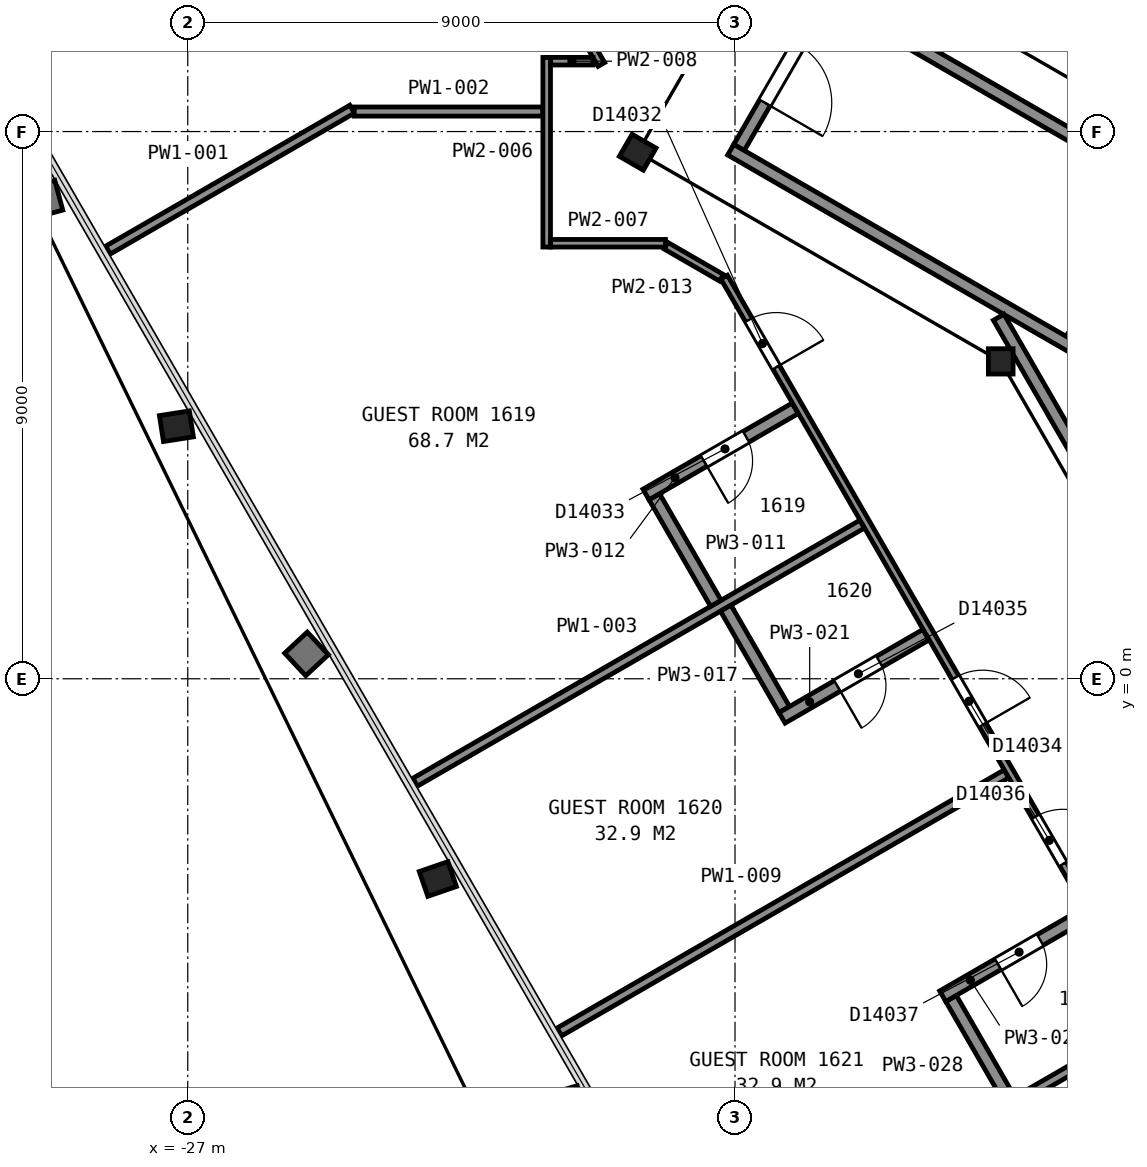
"""IFC4 building model, lengths in metres.
Left out: names, types, materials, properties, quantities, classifications, styles, units other than length and angle.
Written with IfcOpenShell. Run it as: python <this file> out.ifc"""

import sys

from ifc_helpers import new_model, si_unit, direction, frame, frame_2d, origin, origin_2d, place, context, subcontext, project, spatial, rectangle, i_section, extrude, element, fill, save


model = new_model("IFC4")
c1 = context("Model", 3, precision=1e-05, world=origin(), true_north=direction((0.0, 1.0)))
c2 = subcontext(c1, "Body", "Model", "MODEL_VIEW")
j1 = project(units=[si_unit("LENGTHUNIT", "METRE"), si_unit("PLANEANGLEUNIT", "RADIAN")], contexts=[c1])
p1 = place(None, origin())
s1 = spatial("IfcSite", under=j1, at=p1, CompositionType="ELEMENT")
p2 = place(p1, origin())
s2 = spatial("IfcBuilding", under=s1, at=p2, CompositionType="ELEMENT")
p3 = place(p2, frame((0.0, 0.0, 72.8)))
s3 = spatial("IfcBuildingStorey", under=s2, at=p3, CompositionType="ELEMENT", Elevation=72.8)
p4 = place(p3, frame((-27.082, 4.17, 0.025), z_axis=(-0.088495071019, -0.013835916676, 0.995980516785), x_axis=(-0.499820680913, 0.865523193885, -0.032386537004)))
e1 = element("IfcColumn", 1, at=p4, inside=s3, PredefinedType="COLUMN", context=c2, shape_type="SweptSolid", body=[
    extrude(i_section(OverallWidth=0.432, OverallDepth=0.498, WebThickness=0.056, FlangeThickness=0.089, FilletRadius=0.015, at=origin_2d()), origin(), (0.0, 0.0, 1.0), 3.564),
])
p5 = place(p3, frame((-22.792, -3.261, 0.025), z_axis=(-0.080240281001, -0.02768323956, 0.996391055536), x_axis=(-0.500071385104, 0.865832358147, -0.016215344149)))
e2 = element("IfcColumn", 2, at=p5, inside=s3, PredefinedType="COLUMN", context=c2, shape_type="SweptSolid", body=[
    extrude(i_section(OverallWidth=0.432, OverallDepth=0.498, WebThickness=0.056, FlangeThickness=0.089, FilletRadius=0.015, at=origin_2d()), origin(), (0.0, 0.0, 1.0), 3.563),
])
p6 = place(p3, frame((-19.6, 8.66, 0.0), z_axis=(0.0, 0.0, 1.0), x_axis=(0.5, 0.866025403784, 0.0)))
e3 = element("IfcColumn", 3, at=p6, inside=s3, PredefinedType="COLUMN", context=c2, shape_type="SweptSolid", body=[
    extrude(i_section(OverallWidth=0.419, OverallDepth=0.455, WebThickness=0.042, FlangeThickness=0.068, FilletRadius=0.015, at=origin_2d()), origin(), (0.0, 0.0, 1.0), 3.6),
])
p7 = place(p3, frame((-13.63, 5.22, 0.0), z_axis=(0.0, 0.0, 1.0), x_axis=(1.0, 0.0, 0.0)))
e4 = element("IfcColumn", 4, at=p7, inside=s3, PredefinedType="COLUMN", context=c2, shape_type="SweptSolid", body=[
    extrude(i_section(OverallWidth=0.406, OverallDepth=0.417, WebThickness=0.03, FlangeThickness=0.048, FilletRadius=0.015, at=origin_2d()), origin(), (0.0, 0.0, 1.0), 3.6),
])
p8 = place(p3, frame((-16.534, 11.162, 0.0), z_axis=(0.0, 0.0, 1.0), x_axis=(-0.49998411664, -0.866034573852, 0.0)))
e5 = element("IfcWall", 5, at=p8, inside=s3, PredefinedType="PARTITIONING", context=c2, shape_type="SweptSolid", body=[
    extrude(rectangle(XDim=2.8, YDim=0.2, at=frame_2d((1.4, 0.0))), origin(), (0.0, 0.0, 1.0), 3.35),
])
p9 = place(p8, frame((0.85, 0.0, 0.0)))
e6 = element("IfcOpeningElement", 6, at=p9, cuts=e5, PredefinedType="OPENING", context=c2, shape_type="SweptSolid", body=[
    extrude(rectangle(XDim=1.1, YDim=2.1, at=frame_2d((0.55, 1.05))), frame((0.0, 0.11, 0.0), z_axis=(0.0, -1.0, 0.0), x_axis=(1.0, 0.0, 0.0)), (0.0, 0.0, 1.0), 0.22),
])
for number, where, z_axis, x_axis in (
    (7, (-7.678, 2.701, 0.0), (0.0, 0.0, 1.0), (-0.866, 0.5, 0.0)),
    (8, (-6.178, 5.299, 0.0), (0.0, 0.0, 1.0), (-0.866, 0.5, 0.0)),
):
    element("IfcWall", number, at=place(p3, frame(where, z_axis=z_axis, x_axis=x_axis)), inside=s3, PredefinedType="PARTITIONING", context=c2, shape_type="SweptSolid", body=[
        extrude(rectangle(XDim=12.0, YDim=0.2, at=frame_2d((6.0, 0.0))), origin(), (0.0, 0.0, 1.0), 3.35),
    ])
p10 = place(p3, frame((-13.664, 5.946, 0.0), z_axis=(0.0, 0.0, 1.0), x_axis=(0.499994327219, -0.866028678941, 0.0)))
e9 = element("IfcWall", 9, at=p10, inside=s3, PredefinedType="PARTITIONING", context=c2, shape_type="SweptSolid", body=[
    extrude(rectangle(XDim=23.968, YDim=0.2, at=frame_2d((11.984, 0.0))), origin(), (0.0, 0.0, 1.0), 3.35),
])
p11 = place(p3, frame((-28.313, 7.05, 0.0), z_axis=(0.0, 0.0, 1.0), x_axis=(0.866076865069, 0.499910855846, 0.0)))
e10 = element("IfcWall", 10, at=p11, inside=s3, PredefinedType="PARTITIONING", context=c2, shape_type="SweptSolid", body=[
    extrude(rectangle(XDim=4.636, YDim=0.15, at=frame_2d((2.318, 0.0))), origin(), (0.0, 0.0, 1.0), 2.613),
])
p12 = place(p3, frame((-24.262, 9.329, 0.0), z_axis=(0.0, 0.0, 1.0), x_axis=(1.0, 0.0, 0.0)))
e11 = element("IfcWall", 11, at=p12, inside=s3, PredefinedType="PARTITIONING", context=c2, shape_type="SweptSolid", body=[
    extrude(rectangle(XDim=3.103, YDim=0.15, at=frame_2d((1.551, 0.0))), origin(), (0.0, 0.0, 1.0), 2.613),
])
p13 = place(p3, frame((-23.26, -1.701, 0.0), z_axis=(0.0, 0.0, 1.0), x_axis=(0.866027021296, 0.499997198377, 0.0)))
e12 = element("IfcWall", 12, at=p13, inside=s3, PredefinedType="PARTITIONING", context=c2, shape_type="SweptSolid", body=[
    extrude(rectangle(XDim=8.487, YDim=0.15, at=frame_2d((4.243, 0.0))), origin(), (0.0, 0.0, 1.0), 2.613),
])
p14 = place(p3, frame((-21.132, 11.721, 0.0), z_axis=(0.0, 0.0, 1.0), x_axis=(0.500072997275, -0.865983254686, 0.0)))
e13 = element("IfcWall", 13, at=p14, inside=s3, PredefinedType="PARTITIONING", context=c2, shape_type="SweptSolid", body=[
    extrude(rectangle(XDim=1.869, YDim=0.125, at=frame_2d((0.935, 0.0))), origin(), (0.0, 0.0, 1.0), 2.613),
])
p15 = place(p3, frame((-21.097, 7.101, 0.0), z_axis=(0.0, 0.0, 1.0), x_axis=(0.0, 1.0, 0.0)))
e14 = element("IfcWall", 14, at=p15, inside=s3, PredefinedType="PARTITIONING", context=c2, shape_type="SweptSolid", body=[
    extrude(rectangle(XDim=3.119, YDim=0.125, at=frame_2d((1.56, 0.0))), origin(), (0.0, 0.0, 1.0), 2.613),
])
p16 = place(p3, frame((-21.032, 7.163, 0.0), z_axis=(0.0, 0.0, 1.0), x_axis=(1.0, 0.0, 0.0)))
e15 = element("IfcWall", 15, at=p16, inside=s3, PredefinedType="PARTITIONING", context=c2, shape_type="SweptSolid", body=[
    extrude(rectangle(XDim=1.888, YDim=0.125, at=frame_2d((0.944, 0.0))), origin(), (0.0, 0.0, 1.0), 2.613),
])
p17 = place(p3, frame((-21.032, 10.157, 0.0), z_axis=(0.0, 0.0, 1.0), x_axis=(1.0, 0.0, 0.0)))
e16 = element("IfcWall", 16, at=p17, inside=s3, PredefinedType="PARTITIONING", context=c2, shape_type="SweptSolid", body=[
    extrude(rectangle(XDim=0.698, YDim=0.125, at=frame_2d((0.349, 0.0))), origin(), (0.0, 0.0, 1.0), 2.613),
])
p18 = place(p3, frame((-20.889, -5.809, 0.0), z_axis=(0.0, 0.0, 1.0), x_axis=(0.866022790583, 0.50000452617, 0.0)))
e17 = element("IfcWall", 17, at=p18, inside=s3, PredefinedType="PARTITIONING", context=c2, shape_type="SweptSolid", body=[
    extrude(rectangle(XDim=8.491, YDim=0.15, at=frame_2d((4.246, 0.0))), origin(), (0.0, 0.0, 1.0), 2.613),
])
p19 = place(p3, frame((-19.327, 2.994, 0.0), z_axis=(0.0, 0.0, 1.0), x_axis=(0.500042536776, -0.866000843773, 0.0)))
e18 = element("IfcWall", 18, at=p19, inside=s3, PredefinedType="PARTITIONING", context=c2, shape_type="SweptSolid", body=[
    extrude(rectangle(XDim=2.025, YDim=0.2, at=frame_2d((1.012, 0.0))), origin(), (0.0, 0.0, 1.0), 2.613),
])
p20 = place(p3, frame((-17.01, 4.447, 0.0), z_axis=(0.0, 0.0, 1.0), x_axis=(-0.866033446572, -0.499986069224, 0.0)))
e19 = element("IfcWall", 19, at=p20, inside=s3, PredefinedType="PARTITIONING", context=c2, shape_type="SweptSolid", body=[
    extrude(rectangle(XDim=2.833, YDim=0.2, at=frame_2d((1.416, 0.0))), origin(), (0.0, 0.0, 1.0), 2.613),
])
p21 = place(p20, frame((0.933, 0.0, 0.0)))
e20 = element("IfcOpeningElement", 20, at=p21, cuts=e19, PredefinedType="OPENING", context=c2, shape_type="SweptSolid", body=[
    extrude(rectangle(XDim=0.8, YDim=2.1, at=frame_2d((0.4, 1.05))), frame((0.0, 0.11, 0.0), z_axis=(0.0, -1.0, 0.0), x_axis=(1.0, 0.0, 0.0)), (0.0, 0.0, 1.0), 0.22),
])
p22 = place(p3, frame((-19.132, 7.121, 0.0), z_axis=(0.0, 0.0, 1.0), x_axis=(0.865876245925, -0.500258260045, 0.0)))
e21 = element("IfcWall", 21, at=p22, inside=s3, PredefinedType="PARTITIONING", context=c2, shape_type="SweptSolid", body=[
    extrude(rectangle(XDim=1.052, YDim=0.125, at=frame_2d((0.526, 0.0))), origin(), (0.0, 0.0, 1.0), 2.613),
])
p23 = place(p3, frame((-18.517, -9.917, 0.0), z_axis=(0.0, 0.0, 1.0), x_axis=(0.866017528739, 0.50001363973, 0.0)))
e22 = element("IfcWall", 22, at=p23, inside=s3, PredefinedType="PARTITIONING", context=c2, shape_type="SweptSolid", body=[
    extrude(rectangle(XDim=8.491, YDim=0.15, at=frame_2d((4.246, 0.0))), origin(), (0.0, 0.0, 1.0), 2.613),
])
p24 = place(p3, frame((-18.153, 1.161, 0.0), z_axis=(0.0, 0.0, 1.0), x_axis=(0.499971247393, -0.866042003473, 0.0)))
e23 = element("IfcWall", 23, at=p24, inside=s3, PredefinedType="PARTITIONING", context=c2, shape_type="SweptSolid", body=[
    extrude(rectangle(XDim=1.925, YDim=0.2, at=frame_2d((0.963, 0.0))), origin(), (0.0, 0.0, 1.0), 2.613),
])
p25 = place(p3, frame((-3.766, -18.358, 0.0), z_axis=(0.0, 0.0, 1.0), x_axis=(-0.500003973642, 0.866023109589, 0.0)))
e24 = element("IfcWall", 24, at=p25, inside=s3, PredefinedType="PARTITIONING", context=c2, shape_type="SweptSolid", body=[
    extrude(rectangle(XDim=28.826, YDim=0.125, at=frame_2d((14.413, 0.0))), origin(), (0.0, 0.0, 1.0), 2.613),
])
p26 = place(p25, frame((27.114, 0.0, 0.0)))
e25 = element("IfcOpeningElement", 25, at=p26, cuts=e24, PredefinedType="OPENING", context=c2, shape_type="SweptSolid", body=[
    extrude(rectangle(XDim=0.9, YDim=2.1, at=frame_2d((0.45, 1.05))), frame((0.0, 0.073, 0.0), z_axis=(0.0, -1.0, 0.0), x_axis=(1.0, 0.0, 0.0)), (0.0, 0.0, 1.0), 0.145),
])
p27 = place(p25, frame((20.322, 0.0, 0.0)))
e26 = element("IfcOpeningElement", 26, at=p27, cuts=e24, PredefinedType="OPENING", context=c2, shape_type="SweptSolid", body=[
    extrude(rectangle(XDim=0.9, YDim=2.1, at=frame_2d((0.45, 1.05))), frame((0.0, 0.073, 0.0), z_axis=(0.0, -1.0, 0.0), x_axis=(1.0, 0.0, 0.0)), (0.0, 0.0, 1.0), 0.145),
])
p28 = place(p25, frame((17.68, 0.0, 0.0)))
e27 = element("IfcOpeningElement", 27, at=p28, cuts=e24, PredefinedType="OPENING", context=c2, shape_type="SweptSolid", body=[
    extrude(rectangle(XDim=0.9, YDim=2.1, at=frame_2d((0.45, 1.05))), frame((0.0, 0.073, 0.0), z_axis=(0.0, -1.0, 0.0), x_axis=(1.0, 0.0, 0.0)), (0.0, 0.0, 1.0), 0.145),
])
p29 = place(p25, frame((10.836, 0.0, 0.0)))
e28 = element("IfcOpeningElement", 28, at=p29, cuts=e24, PredefinedType="OPENING", context=c2, shape_type="SweptSolid", body=[
    extrude(rectangle(XDim=0.9, YDim=2.1, at=frame_2d((0.45, 1.05))), frame((0.0, 0.073, 0.0), z_axis=(0.0, -1.0, 0.0), x_axis=(1.0, 0.0, 0.0)), (0.0, 0.0, 1.0), 0.145),
])
p30 = place(p25, frame((7.342, 0.0, 0.0)))
e29 = element("IfcOpeningElement", 29, at=p30, cuts=e24, PredefinedType="OPENING", context=c2, shape_type="SweptSolid", body=[
    extrude(rectangle(XDim=0.9, YDim=2.1, at=frame_2d((0.45, 1.05))), frame((0.0, 0.073, 0.0), z_axis=(0.0, -1.0, 0.0), x_axis=(1.0, 0.0, 0.0)), (0.0, 0.0, 1.0), 0.145),
])
p31 = place(p3, frame((-17.227, -0.643, 0.0), z_axis=(0.0, 0.0, 1.0), x_axis=(0.866012976267, 0.500021524473, 0.0)))
e30 = element("IfcWall", 30, at=p31, inside=s3, PredefinedType="PARTITIONING", context=c2, shape_type="SweptSolid", body=[
    extrude(rectangle(XDim=2.732, YDim=0.2, at=frame_2d((1.366, 0.0))), origin(), (0.0, 0.0, 1.0), 2.613),
])
p32 = place(p31, frame((1.05, 0.0, 0.0)))
e31 = element("IfcOpeningElement", 31, at=p32, cuts=e30, PredefinedType="OPENING", context=c2, shape_type="SweptSolid", body=[
    extrude(rectangle(XDim=0.8, YDim=2.1, at=frame_2d((0.4, 1.05))), frame((0.0, 0.11, 0.0), z_axis=(0.0, -1.0, 0.0), x_axis=(1.0, 0.0, 0.0)), (0.0, 0.0, 1.0), 0.22),
])
p33 = place(p3, frame((-14.447, -5.258, 0.0), z_axis=(0.0, 0.0, 1.0), x_axis=(0.499667418833, -0.866217334482, 0.0)))
e32 = element("IfcWall", 32, at=p33, inside=s3, PredefinedType="PARTITIONING", context=c2, shape_type="SweptSolid", body=[
    extrude(rectangle(XDim=1.92, YDim=0.2, at=frame_2d((0.96, 0.0))), origin(), (0.0, 0.0, 1.0), 2.613),
])
p34 = place(p3, frame((-12.213, -3.852, 0.0), z_axis=(0.0, 0.0, 1.0), x_axis=(-0.866005850709, -0.50003386539, 0.0)))
e33 = element("IfcWall", 33, at=p34, inside=s3, PredefinedType="PARTITIONING", context=c2, shape_type="SweptSolid", body=[
    extrude(rectangle(XDim=2.737, YDim=0.2, at=frame_2d((1.369, 0.0))), origin(), (0.0, 0.0, 1.0), 2.613),
])
p35 = place(p34, frame((0.887, 0.0, 0.0)))
e34 = element("IfcOpeningElement", 34, at=p35, cuts=e33, PredefinedType="OPENING", context=c2, shape_type="SweptSolid", body=[
    extrude(rectangle(XDim=0.8, YDim=2.1, at=frame_2d((0.4, 1.05))), frame((0.0, 0.11, 0.0), z_axis=(0.0, -1.0, 0.0), x_axis=(1.0, 0.0, 0.0)), (0.0, 0.0, 1.0), 0.22),
])
p36 = place(p9, origin())
e35 = element("IfcDoor", 35, at=p36, inside=s3, OperationType="SINGLE_SWING_RIGHT", PredefinedType="DOOR", context=c2, shape_type="SweptSolid", body=[
    extrude(rectangle(XDim=1.1, YDim=2.1, at=frame_2d((0.55, 1.05))), frame((0.0, 0.025, 0.0), z_axis=(0.0, -1.0, 0.0), x_axis=(1.0, 0.0, 0.0)), (0.0, 0.0, 1.0), 0.05),
])
fill(e6, e35)
p37 = place(p21, origin())
e36 = element("IfcDoor", 36, at=p37, inside=s3, OperationType="SINGLE_SWING_RIGHT", PredefinedType="DOOR", context=c2, shape_type="SweptSolid", body=[
    extrude(rectangle(XDim=0.8, YDim=2.1, at=frame_2d((0.4, 1.05))), frame((0.0, 0.025, 0.0), z_axis=(0.0, -1.0, 0.0), x_axis=(1.0, 0.0, 0.0)), (0.0, 0.0, 1.0), 0.05),
])
fill(e20, e36)
p38 = place(p26, origin())
e37 = element("IfcDoor", 37, at=p38, inside=s3, OperationType="SINGLE_SWING_LEFT", PredefinedType="DOOR", context=c2, shape_type="SweptSolid", body=[
    extrude(rectangle(XDim=0.9, YDim=2.1, at=frame_2d((0.45, 1.05))), frame((0.0, 0.025, 0.0), z_axis=(0.0, -1.0, 0.0), x_axis=(1.0, 0.0, 0.0)), (0.0, 0.0, 1.0), 0.05),
])
fill(e25, e37)
p39 = place(p27, origin())
e38 = element("IfcDoor", 38, at=p39, inside=s3, OperationType="SINGLE_SWING_LEFT", PredefinedType="DOOR", context=c2, shape_type="SweptSolid", body=[
    extrude(rectangle(XDim=0.9, YDim=2.1, at=frame_2d((0.45, 1.05))), frame((0.0, 0.025, 0.0), z_axis=(0.0, -1.0, 0.0), x_axis=(1.0, 0.0, 0.0)), (0.0, 0.0, 1.0), 0.05),
])
fill(e26, e38)
p40 = place(p28, origin())
e39 = element("IfcDoor", 39, at=p40, inside=s3, OperationType="SINGLE_SWING_LEFT", PredefinedType="DOOR", context=c2, shape_type="SweptSolid", body=[
    extrude(rectangle(XDim=0.9, YDim=2.1, at=frame_2d((0.45, 1.05))), frame((0.0, 0.025, 0.0), z_axis=(0.0, -1.0, 0.0), x_axis=(1.0, 0.0, 0.0)), (0.0, 0.0, 1.0), 0.05),
])
fill(e27, e39)
p41 = place(p32, origin())
e40 = element("IfcDoor", 40, at=p41, inside=s3, OperationType="SINGLE_SWING_LEFT", PredefinedType="DOOR", context=c2, shape_type="SweptSolid", body=[
    extrude(rectangle(XDim=0.8, YDim=2.1, at=frame_2d((0.4, 1.05))), frame((0.0, 0.025, 0.0), z_axis=(0.0, -1.0, 0.0), x_axis=(1.0, 0.0, 0.0)), (0.0, 0.0, 1.0), 0.05),
])
fill(e31, e40)
p42 = place(p35, origin())
e41 = element("IfcDoor", 41, at=p42, inside=s3, OperationType="SINGLE_SWING_RIGHT", PredefinedType="DOOR", context=c2, shape_type="SweptSolid", body=[
    extrude(rectangle(XDim=0.8, YDim=2.1, at=frame_2d((0.4, 1.05))), frame((0.0, 0.025, 0.0), z_axis=(0.0, -1.0, 0.0), x_axis=(1.0, 0.0, 0.0)), (0.0, 0.0, 1.0), 0.05),
])
fill(e34, e41)
save(model, sys.argv[1])
